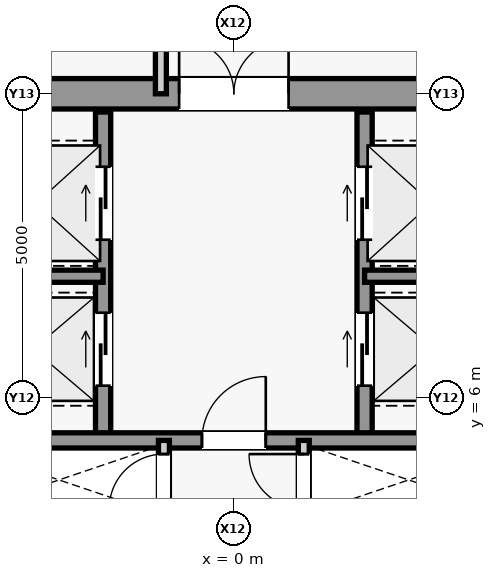
"""IFC4 building model, lengths in metres.
Left out: names, types, materials, properties, quantities, classifications, styles, units other than length and angle.
Written with IfcOpenShell. Run it as: python <this file> out.ifc"""

import sys

from ifc_helpers import new_model, si_unit, direction, frame, frame_2d, origin, place, context, subcontext, project, spatial, rectangle, extrude, source, transform, mapped, element, fill, save


model = new_model("IFC4")
c1 = context("Model", 3, precision=1e-05, world=origin(), true_north=direction((0.0, 1.0)))
c2 = subcontext(c1, "Body", "Model", "MODEL_VIEW")
j1 = project(units=[si_unit("LENGTHUNIT", "METRE"), si_unit("PLANEANGLEUNIT", "RADIAN")], contexts=[c1])
p1 = place(None, origin())
s1 = spatial("IfcSite", under=j1, at=p1, CompositionType="ELEMENT")
p2 = place(p1, origin())
s2 = spatial("IfcBuilding", under=s1, at=p2, CompositionType="ELEMENT")
p3 = place(p2, frame((0.0, 0.0, 207.1)))
s3 = spatial("IfcBuildingStorey", under=s2, at=p3, CompositionType="ELEMENT", Elevation=207.1)
m1 = source(origin(), c2, "Body", "SweptSolid", [
    extrude(rectangle(XDim=9.2, YDim=0.5, at=frame_2d((4.6, 0.0))), origin(), (0.0, 0.0, 1.0), 3.78),
])
p4 = place(p3, frame((-4.6, 11.0, 0.0), z_axis=(0.0, 0.0, 1.0), x_axis=(1.0, 0.0, 0.0)))
e1 = element("IfcWall", 1, at=p4, inside=s3, PredefinedType="SHEAR", context=c2, shape_type="MappedRepresentation", body=[
    mapped(m1, transform((0.0, 0.0, 0.0), scale=1.0)),
])
m2 = source(origin(), c2, "Body", "SweptSolid", [
    extrude(rectangle(XDim=1.8, YDim=2.25, at=frame_2d((0.9, 1.125))), frame((0.0, 0.26, 0.0), z_axis=(0.0, -1.0, 0.0), x_axis=(1.0, 0.0, 0.0)), (0.0, 0.0, 1.0), 0.52),
])
p5 = place(p4, frame((3.7, 0.0, 0.0)))
e2 = element("IfcOpeningElement", 2, at=p5, cuts=e1, PredefinedType="OPENING", context=c2, shape_type="MappedRepresentation", body=[
    mapped(m2, transform((0.0, 0.0, 0.0), scale=1.0)),
])
m3 = source(origin(), c2, "Body", "SweptSolid", [
    extrude(rectangle(XDim=5.4, YDim=0.25, at=frame_2d((2.7, 0.0))), origin(), (0.0, 0.0, 1.0), 3.78),
])
p6 = place(p3, frame((-2.15, 5.3, 0.0), z_axis=(0.0, 0.0, 1.0), x_axis=(0.0, 1.0, 0.0)))
e3 = element("IfcWall", 3, at=p6, inside=s3, PredefinedType="SHEAR", context=c2, shape_type="MappedRepresentation", body=[
    mapped(m3, transform((0.0, 0.0, 0.0), scale=1.0)),
])
m4 = source(origin(), c2, "Body", "SweptSolid", [
    extrude(rectangle(XDim=1.2, YDim=2.3, at=frame_2d((0.6, 1.15))), frame((0.0, 0.135, 0.0), z_axis=(0.0, -1.0, 0.0), x_axis=(1.0, 0.0, 0.0)), (0.0, 0.0, 1.0), 0.27),
])
p7 = place(p6, frame((3.3, 0.0, 0.0)))
e4 = element("IfcOpeningElement", 4, at=p7, cuts=e3, PredefinedType="OPENING", context=c2, shape_type="MappedRepresentation", body=[
    mapped(m4, transform((0.0, 0.0, 0.0), scale=1.0)),
])
p8 = place(p6, frame((0.9, 0.0, 0.0)))
e5 = element("IfcOpeningElement", 5, at=p8, cuts=e3, PredefinedType="OPENING", context=c2, shape_type="MappedRepresentation", body=[
    mapped(m4, transform((0.0, 0.0, 0.0), scale=1.0)),
])
p9 = place(p3, frame((2.15, 5.3, 0.0), z_axis=(0.0, 0.0, 1.0), x_axis=(0.0, 1.0, 0.0)))
e6 = element("IfcWall", 6, at=p9, inside=s3, PredefinedType="SHEAR", context=c2, shape_type="MappedRepresentation", body=[
    mapped(m3, transform((0.0, 0.0, 0.0), scale=1.0)),
])
p10 = place(p9, frame((3.3, 0.0, 0.0)))
e7 = element("IfcOpeningElement", 7, at=p10, cuts=e6, PredefinedType="OPENING", context=c2, shape_type="MappedRepresentation", body=[
    mapped(m4, transform((0.0, 0.0, 0.0), scale=1.0)),
])
p11 = place(p9, frame((0.9, 0.0, 0.0)))
e8 = element("IfcOpeningElement", 8, at=p11, cuts=e6, PredefinedType="OPENING", context=c2, shape_type="MappedRepresentation", body=[
    mapped(m4, transform((0.0, 0.0, 0.0), scale=1.0)),
])
m5 = source(origin(), c2, "Body", "SweptSolid", [
    extrude(rectangle(XDim=2.45, YDim=0.2, at=frame_2d((1.225, 0.0))), origin(), (0.0, 0.0, 1.0), 3.78),
])
for number, where, z_axis, x_axis in (
    (9, (-4.6, 8.0, 0.0), (0.0, 0.0, 1.0), (1.0, 0.0, 0.0)),
    (10, (2.15, 8.0, 0.0), (0.0, 0.0, 1.0), (1.0, 0.0, 0.0)),
):
    element("IfcWall", number, at=place(p3, frame(where, z_axis=z_axis, x_axis=x_axis)), inside=s3, PredefinedType="SHEAR", context=c2, shape_type="MappedRepresentation", body=[
        mapped(m5, transform((0.0, 0.0, 0.0), scale=1.0)),
    ])
m6 = source(origin(), c2, "Body", "SweptSolid", [
    extrude(rectangle(XDim=9.2, YDim=0.25, at=frame_2d((4.6, 0.0))), origin(), (0.0, 0.0, 1.0), 3.78),
])
p12 = place(p3, frame((-4.6, 5.3, 0.0), z_axis=(0.0, 0.0, 1.0), x_axis=(1.0, 0.0, 0.0)))
e11 = element("IfcWall", 11, at=p12, inside=s3, PredefinedType="SHEAR", context=c2, shape_type="MappedRepresentation", body=[
    mapped(m6, transform((0.0, 0.0, 0.0), scale=1.0)),
])
m7 = source(origin(), c2, "Body", "SweptSolid", [
    extrude(rectangle(XDim=1.05, YDim=2.2, at=frame_2d((0.525, 1.1))), frame((0.0, 0.135, 0.0), z_axis=(0.0, -1.0, 0.0), x_axis=(1.0, 0.0, 0.0)), (0.0, 0.0, 1.0), 0.27),
])
p13 = place(p12, frame((4.075, 0.0, 0.0)))
e12 = element("IfcOpeningElement", 12, at=p13, cuts=e11, PredefinedType="OPENING", context=c2, shape_type="MappedRepresentation", body=[
    mapped(m7, transform((0.0, 0.0, 0.0), scale=1.0)),
])
m8 = source(origin(), c2, "Body", "SweptSolid", [
    extrude(rectangle(XDim=10.6, YDim=0.18, at=frame_2d((5.3, 0.0))), origin(), (0.0, 0.0, 1.0), 3.78),
])
p14 = place(p3, frame((-1.15, -5.3, 0.0), z_axis=(0.0, 0.0, 1.0), x_axis=(0.0, 1.0, 0.0)))
e13 = element("IfcWall", 13, at=p14, inside=s3, PredefinedType="PARTITIONING", context=c2, shape_type="MappedRepresentation", body=[
    mapped(m8, transform((0.0, 0.0, 0.0), scale=1.0)),
])
m9 = source(origin(), c2, "Body", "SweptSolid", [
    extrude(rectangle(XDim=0.9, YDim=2.15, at=frame_2d((0.45, 1.075))), frame((0.0, 0.1, 0.0), z_axis=(0.0, -1.0, 0.0), x_axis=(1.0, 0.0, 0.0)), (0.0, 0.0, 1.0), 0.2),
])
p15 = place(p14, frame((1.9, 0.0, 0.0)))
e14 = element("IfcOpeningElement", 14, at=p15, cuts=e13, PredefinedType="OPENING", context=c2, shape_type="MappedRepresentation", body=[
    mapped(m9, transform((0.0, 0.0, 0.0), scale=1.0)),
])
p16 = place(p14, frame((6.55, 0.0, 0.0)))
e15 = element("IfcOpeningElement", 15, at=p16, cuts=e13, PredefinedType="OPENING", context=c2, shape_type="MappedRepresentation", body=[
    mapped(m9, transform((0.0, 0.0, 0.0), scale=1.0)),
])
p17 = place(p14, frame((9.475, 0.0, 0.0)))
e16 = element("IfcOpeningElement", 16, at=p17, cuts=e13, PredefinedType="OPENING", context=c2, shape_type="MappedRepresentation", body=[
    mapped(m9, transform((0.0, 0.0, 0.0), scale=1.0)),
])
p18 = place(p3, frame((1.15, -5.3, 0.0), z_axis=(0.0, 0.0, 1.0), x_axis=(0.0, 1.0, 0.0)))
e17 = element("IfcWall", 17, at=p18, inside=s3, PredefinedType="PARTITIONING", context=c2, shape_type="MappedRepresentation", body=[
    mapped(m8, transform((0.0, 0.0, 0.0), scale=1.0)),
])
p19 = place(p18, frame((0.85, 0.0, 0.0)))
e18 = element("IfcOpeningElement", 18, at=p19, cuts=e17, PredefinedType="OPENING", context=c2, shape_type="MappedRepresentation", body=[
    mapped(m9, transform((0.0, 0.0, 0.0), scale=1.0)),
])
p20 = place(p18, frame((3.55, 0.0, 0.0)))
e19 = element("IfcOpeningElement", 19, at=p20, cuts=e17, PredefinedType="OPENING", context=c2, shape_type="MappedRepresentation", body=[
    mapped(m9, transform((0.0, 0.0, 0.0), scale=1.0)),
])
p21 = place(p18, frame((6.3, 0.0, 0.0)))
e20 = element("IfcOpeningElement", 20, at=p21, cuts=e17, PredefinedType="OPENING", context=c2, shape_type="MappedRepresentation", body=[
    mapped(m9, transform((0.0, 0.0, 0.0), scale=1.0)),
])
p22 = place(p18, frame((8.25, 0.0, 0.0)))
e21 = element("IfcOpeningElement", 21, at=p22, cuts=e17, PredefinedType="OPENING", context=c2, shape_type="MappedRepresentation", body=[
    mapped(m9, transform((0.0, 0.0, 0.0), scale=1.0)),
])
p23 = place(p18, frame((9.475, 0.0, 0.0)))
e22 = element("IfcOpeningElement", 22, at=p23, cuts=e17, PredefinedType="OPENING", context=c2, shape_type="MappedRepresentation", body=[
    mapped(m9, transform((0.0, 0.0, 0.0), scale=1.0)),
])
m10 = source(origin(), c2, "Body", "SweptSolid", [
    extrude(rectangle(XDim=3.1, YDim=0.18, at=frame_2d((1.55, 0.0))), origin(), (0.0, 0.0, 1.0), 3.78),
])
p24 = place(p3, frame((-1.2, 11.0, 0.0), z_axis=(0.0, 0.0, 1.0), x_axis=(0.0, 1.0, 0.0)))
e23 = element("IfcWall", 23, at=p24, inside=s3, PredefinedType="PARTITIONING", context=c2, shape_type="MappedRepresentation", body=[
    mapped(m10, transform((0.0, 0.0, 0.0), scale=1.0)),
])
m11 = source(origin(), c2, "Body", "SweptSolid", [
    extrude(rectangle(XDim=1.05, YDim=2.2, at=frame_2d((0.525, 1.1))), frame((0.0, 0.025, 0.0), z_axis=(0.0, -1.0, 0.0), x_axis=(1.0, 0.0, 0.0)), (0.0, 0.0, 1.0), 0.05),
])
p25 = place(p13, origin())
e24 = element("IfcDoor", 24, at=p25, inside=s3, OperationType="SINGLE_SWING_RIGHT", PredefinedType="DOOR", context=c2, shape_type="MappedRepresentation", body=[
    mapped(m11, transform((0.0, 0.0, 0.0), scale=1.0)),
])
fill(e12, e24)
m12 = source(origin(), c2, "Body", "SweptSolid", [
    extrude(rectangle(XDim=1.8, YDim=2.25, at=frame_2d((0.9, 1.125))), frame((0.0, 0.025, 0.0), z_axis=(0.0, -1.0, 0.0), x_axis=(1.0, 0.0, 0.0)), (0.0, 0.0, 1.0), 0.05),
])
p26 = place(p5, origin())
e25 = element("IfcDoor", 25, at=p26, inside=s3, OperationType="SINGLE_SWING_RIGHT", PredefinedType="DOOR", context=c2, shape_type="MappedRepresentation", body=[
    mapped(m12, transform((0.0, 0.0, 0.0), scale=1.0)),
])
fill(e2, e25)
m13 = source(origin(), c2, "Body", "SweptSolid", [
    extrude(rectangle(XDim=0.9, YDim=2.15, at=frame_2d((0.45, 1.075))), frame((0.0, 0.025, 0.0), z_axis=(0.0, -1.0, 0.0), x_axis=(1.0, 0.0, 0.0)), (0.0, 0.0, 1.0), 0.05),
])
p27 = place(p17, origin())
e26 = element("IfcDoor", 26, at=p27, inside=s3, OperationType="SINGLE_SWING_LEFT", PredefinedType="DOOR", context=c2, shape_type="MappedRepresentation", body=[
    mapped(m13, transform((0.0, 0.0, 0.0), scale=1.0)),
])
fill(e16, e26)
p28 = place(p23, origin())
e27 = element("IfcDoor", 27, at=p28, inside=s3, OperationType="SINGLE_SWING_RIGHT", PredefinedType="DOOR", context=c2, shape_type="MappedRepresentation", body=[
    mapped(m13, transform((0.0, 0.0, 0.0), scale=1.0)),
])
fill(e22, e27)
m14 = source(origin(), c2, "Body", "SweptSolid", [
    extrude(rectangle(XDim=1.2, YDim=2.3, at=frame_2d((0.6, 1.15))), frame((0.0, 0.025, 0.0), z_axis=(0.0, -1.0, 0.0), x_axis=(1.0, 0.0, 0.0)), (0.0, 0.0, 1.0), 0.05),
])
p29 = place(p7, origin())
e28 = element("IfcDoor", 28, at=p29, inside=s3, OperationType="SLIDING_TO_LEFT", PredefinedType="DOOR", context=c2, shape_type="MappedRepresentation", body=[
    mapped(m14, transform((0.0, 0.0, 0.0), scale=1.0)),
])
fill(e4, e28)
p30 = place(p10, origin())
e29 = element("IfcDoor", 29, at=p30, inside=s3, OperationType="SLIDING_TO_LEFT", PredefinedType="DOOR", context=c2, shape_type="MappedRepresentation", body=[
    mapped(m14, transform((0.0, 0.0, 0.0), scale=1.0)),
])
fill(e7, e29)
p31 = place(p8, origin())
e30 = element("IfcDoor", 30, at=p31, inside=s3, OperationType="SLIDING_TO_LEFT", PredefinedType="DOOR", context=c2, shape_type="MappedRepresentation", body=[
    mapped(m14, transform((0.0, 0.0, 0.0), scale=1.0)),
])
fill(e5, e30)
p32 = place(p11, origin())
e31 = element("IfcDoor", 31, at=p32, inside=s3, OperationType="SLIDING_TO_LEFT", PredefinedType="DOOR", context=c2, shape_type="MappedRepresentation", body=[
    mapped(m14, transform((0.0, 0.0, 0.0), scale=1.0)),
])
fill(e8, e31)
save(model, sys.argv[1])
